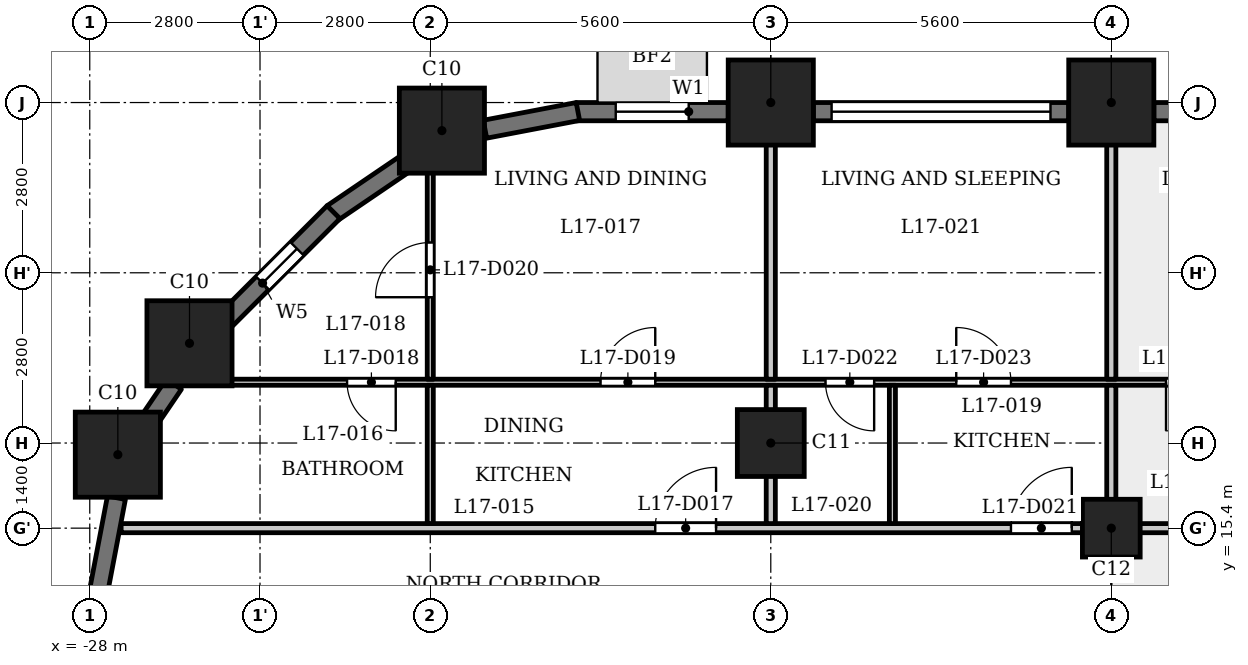
"""IFC4 building model, lengths in metres.
Left out: names, types, materials, properties, quantities, classifications, styles, units other than length and angle.
Written with IfcOpenShell. Run it as: python <this file> out.ifc"""

import sys

from ifc_helpers import new_model, si_unit, direction, frame, frame_2d, origin, origin_2d, place, context, subcontext, project, spatial, rectangle, extrude, element, fill, save


model = new_model("IFC4")
c1 = context("Model", 3, precision=1e-05, world=origin(), true_north=direction((0.0, 1.0)))
c2 = subcontext(c1, "Body", "Model", "MODEL_VIEW")
j1 = project(units=[si_unit("LENGTHUNIT", "METRE"), si_unit("PLANEANGLEUNIT", "RADIAN")], contexts=[c1])
p1 = place(None, origin())
s1 = spatial("IfcSite", under=j1, at=p1, CompositionType="ELEMENT")
p2 = place(p1, origin())
s2 = spatial("IfcBuilding", under=s1, at=p2, CompositionType="ELEMENT")
p3 = place(p2, frame((0.0, 0.0, 69.0)))
s3 = spatial("IfcBuildingStorey", under=s2, at=p3, CompositionType="ELEMENT", Elevation=69.0)
for number, where, z_axis, x_axis in (
    (1, (-11.2, 22.4, 0.0), (0.0, 0.0, 1.0), (1.0, 0.0, 0.0)),
    (2, (-16.8, 22.4, 0.0), (0.0, 0.0, 1.0), (1.0, 0.0, 0.0)),
    (3, (-22.209, 21.938, 0.0), (0.0, 0.0, 1.0), (1.0, 0.0, 0.0)),
    (4, (-26.36, 18.44, 0.0), (0.0, 0.0, 1.0), (1.0, 0.0, 0.0)),
    (5, (-27.538, 16.609, 0.0), (0.0, 0.0, 1.0), (1.0, 0.0, 0.0)),
):
    element("IfcColumn", number, at=place(p3, frame(where, z_axis=z_axis, x_axis=x_axis)), inside=s3, PredefinedType="COLUMN", context=c2, shape_type="SweptSolid", body=[
        extrude(rectangle(XDim=1.4, YDim=1.4, at=origin_2d()), origin(), (0.0, 0.0, 1.0), 3.5),
    ])
p4 = place(p3, frame((-16.8, 16.8, 0.0), z_axis=(0.0, 0.0, 1.0), x_axis=(1.0, 0.0, 0.0)))
e6 = element("IfcColumn", 6, at=p4, inside=s3, PredefinedType="COLUMN", context=c2, shape_type="SweptSolid", body=[
    extrude(rectangle(XDim=1.1, YDim=1.1, at=origin_2d()), origin(), (0.0, 0.0, 1.0), 3.5),
])
p5 = place(p3, frame((-11.2, 15.4, 0.0), z_axis=(0.0, 0.0, 1.0), x_axis=(1.0, 0.0, 0.0)))
e7 = element("IfcColumn", 7, at=p5, inside=s3, PredefinedType="COLUMN", context=c2, shape_type="SweptSolid", body=[
    extrude(rectangle(XDim=0.95, YDim=0.95, at=origin_2d()), origin(), (0.0, 0.0, 1.0), 3.5),
])
p6 = place(p3, frame((-6.3, 22.25, 0.0), z_axis=(0.0, 0.0, 1.0), x_axis=(-1.0, 0.0, 0.0)))
e8 = element("IfcWall", 8, at=p6, inside=s3, PredefinedType="SOLIDWALL", context=c2, shape_type="SweptSolid", body=[
    extrude(rectangle(XDim=4.2, YDim=0.3, at=frame_2d((2.1, 0.0))), origin(), (0.0, 0.0, 1.0), 2.3),
])
p7 = place(p6, frame((0.3, 0.0, 1.2)))
e9 = element("IfcOpeningElement", 9, at=p7, cuts=e8, PredefinedType="OPENING", context=c2, shape_type="SweptSolid", body=[
    extrude(rectangle(XDim=3.6, YDim=0.95, at=frame_2d((1.8, 0.475))), frame((0.0, 0.16, 0.0), z_axis=(0.0, -1.0, 0.0), x_axis=(1.0, 0.0, 0.0)), (0.0, 0.0, 1.0), 0.32),
])
p8 = place(p3, frame((-11.9, 22.25, 0.0), z_axis=(0.0, 0.0, 1.0), x_axis=(-1.0, 0.0, 0.0)))
e10 = element("IfcWall", 10, at=p8, inside=s3, PredefinedType="SOLIDWALL", context=c2, shape_type="SweptSolid", body=[
    extrude(rectangle(XDim=4.2, YDim=0.3, at=frame_2d((2.1, 0.0))), origin(), (0.0, 0.0, 1.0), 2.3),
])
p9 = place(p8, frame((0.3, 0.0, 1.2)))
e11 = element("IfcOpeningElement", 11, at=p9, cuts=e10, PredefinedType="OPENING", context=c2, shape_type="SweptSolid", body=[
    extrude(rectangle(XDim=3.6, YDim=0.95, at=frame_2d((1.8, 0.475))), frame((0.0, 0.16, 0.0), z_axis=(0.0, -1.0, 0.0), x_axis=(1.0, 0.0, 0.0)), (0.0, 0.0, 1.0), 0.32),
])
p10 = place(p3, frame((-17.5, 22.25, 0.0), z_axis=(0.0, 0.0, 1.0), x_axis=(-1.0, 0.0, 0.0)))
e12 = element("IfcWall", 12, at=p10, inside=s3, PredefinedType="SOLIDWALL", context=c2, shape_type="SweptSolid", body=[
    extrude(rectangle(XDim=2.5, YDim=0.3, at=frame_2d((1.25, 0.0))), origin(), (0.0, 0.0, 1.0), 2.3),
])
p11 = place(p10, frame((0.65, 0.0, 0.6)))
e13 = element("IfcOpeningElement", 13, at=p11, cuts=e12, PredefinedType="OPENING", context=c2, shape_type="SweptSolid", body=[
    extrude(rectangle(XDim=1.2, YDim=1.55, at=frame_2d((0.6, 0.775))), frame((0.0, 0.16, 0.0), z_axis=(0.0, -1.0, 0.0), x_axis=(1.0, 0.0, 0.0)), (0.0, 0.0, 1.0), 0.32),
])
p12 = place(p3, frame((-19.972, 22.253, 0.0), z_axis=(0.0, 0.0, 1.0), x_axis=(-0.982297345734, -0.187328386968, 0.0)))
e14 = element("IfcWall", 14, at=p12, inside=s3, PredefinedType="SOLIDWALL", context=c2, shape_type="SweptSolid", body=[
    extrude(rectangle(XDim=1.556, YDim=0.3, at=frame_2d((0.778, 0.0))), origin(), (0.0, 0.0, 1.0), 2.3),
])
p13 = place(p3, frame((-22.726, 21.454, 0.0), z_axis=(0.0, 0.0, 1.0), x_axis=(-0.827019875346, -0.562172683241, 0.0)))
e15 = element("IfcWall", 15, at=p13, inside=s3, PredefinedType="SOLIDWALL", context=c2, shape_type="SweptSolid", body=[
    extrude(rectangle(XDim=1.556, YDim=0.3, at=frame_2d((0.778, 0.0))), origin(), (0.0, 0.0, 1.0), 2.3),
])
p14 = place(p3, frame((-23.991, 20.597, 0.0), z_axis=(0.0, 0.0, 1.0), x_axis=(-0.707106781187, -0.707106781187, 0.0)))
e16 = element("IfcWall", 16, at=p14, inside=s3, PredefinedType="SOLIDWALL", context=c2, shape_type="SweptSolid", body=[
    extrude(rectangle(XDim=2.5, YDim=0.3, at=frame_2d((1.25, 0.0))), origin(), (0.0, 0.0, 1.0), 2.3),
])
p15 = place(p14, frame((0.85, 0.0, 0.6)))
e17 = element("IfcOpeningElement", 17, at=p15, cuts=e16, PredefinedType="OPENING", context=c2, shape_type="SweptSolid", body=[
    extrude(rectangle(XDim=0.8, YDim=1.55, at=frame_2d((0.4, 0.775))), frame((0.0, 0.16, 0.0), z_axis=(0.0, -1.0, 0.0), x_axis=(1.0, 0.0, 0.0)), (0.0, 0.0, 1.0), 0.32),
])
p16 = place(p3, frame((-26.617, 17.769, 0.0), z_axis=(0.0, 0.0, 1.0), x_axis=(-0.562000651531, -0.827136788977, 0.0)))
e18 = element("IfcWall", 18, at=p16, inside=s3, PredefinedType="SOLIDWALL", context=c2, shape_type="SweptSolid", body=[
    extrude(rectangle(XDim=0.777, YDim=0.3, at=frame_2d((0.389, 0.0))), origin(), (0.0, 0.0, 1.0), 3.15),
])
p17 = place(p3, frame((-27.561, 15.9, 0.0), z_axis=(0.0, 0.0, 1.0), x_axis=(-0.187328386968, -0.982297345734, 0.0)))
e19 = element("IfcWall", 19, at=p17, inside=s3, PredefinedType="SOLIDWALL", context=c2, shape_type="SweptSolid", body=[
    extrude(rectangle(XDim=1.556, YDim=0.3, at=frame_2d((0.778, 0.0))), origin(), (0.0, 0.0, 1.0), 2.3),
])
p18 = place(p3, frame((-27.484, 15.4, 0.0), z_axis=(0.0, 0.0, 1.0), x_axis=(1.0, 0.0, 0.0)))
e20 = element("IfcWall", 20, at=p18, inside=s3, PredefinedType="PARTITIONING", context=c2, shape_type="SweptSolid", body=[
    extrude(rectangle(XDim=54.968, YDim=0.15, at=frame_2d((27.484, 0.0))), origin(), (0.0, 0.0, 1.0), 3.15),
])
p19 = place(p18, frame((8.784, 0.0, 0.0)))
e21 = element("IfcOpeningElement", 21, at=p19, cuts=e20, PredefinedType="OPENING", context=c2, shape_type="SweptSolid", body=[
    extrude(rectangle(XDim=1.0, YDim=2.1, at=frame_2d((0.5, 1.05))), frame((0.0, 0.085, 0.0), z_axis=(0.0, -1.0, 0.0), x_axis=(1.0, 0.0, 0.0)), (0.0, 0.0, 1.0), 0.17),
])
p20 = place(p18, frame((14.634, 0.0, 0.0)))
e22 = element("IfcOpeningElement", 22, at=p20, cuts=e20, PredefinedType="OPENING", context=c2, shape_type="SweptSolid", body=[
    extrude(rectangle(XDim=1.0, YDim=2.1, at=frame_2d((0.5, 1.05))), frame((0.0, 0.085, 0.0), z_axis=(0.0, -1.0, 0.0), x_axis=(1.0, 0.0, 0.0)), (0.0, 0.0, 1.0), 0.17),
])
p21 = place(p18, frame((19.484, 0.0, 0.0)))
e23 = element("IfcOpeningElement", 23, at=p21, cuts=e20, PredefinedType="OPENING", context=c2, shape_type="SweptSolid", body=[
    extrude(rectangle(XDim=1.0, YDim=2.1, at=frame_2d((0.5, 1.05))), frame((0.0, 0.085, 0.0), z_axis=(0.0, -1.0, 0.0), x_axis=(1.0, 0.0, 0.0)), (0.0, 0.0, 1.0), 0.17),
])
p22 = place(p18, frame((23.634, 0.0, 0.0)))
e24 = element("IfcOpeningElement", 24, at=p22, cuts=e20, PredefinedType="OPENING", context=c2, shape_type="SweptSolid", body=[
    extrude(rectangle(XDim=1.0, YDim=2.1, at=frame_2d((0.5, 1.05))), frame((0.0, 0.085, 0.0), z_axis=(0.0, -1.0, 0.0), x_axis=(1.0, 0.0, 0.0)), (0.0, 0.0, 1.0), 0.17),
])
p23 = place(p18, frame((28.234, 0.0, 0.0)))
e25 = element("IfcOpeningElement", 25, at=p23, cuts=e20, PredefinedType="OPENING", context=c2, shape_type="SweptSolid", body=[
    extrude(rectangle(XDim=1.0, YDim=2.1, at=frame_2d((0.5, 1.05))), frame((0.0, 0.085, 0.0), z_axis=(0.0, -1.0, 0.0), x_axis=(1.0, 0.0, 0.0)), (0.0, 0.0, 1.0), 0.17),
])
p24 = place(p18, frame((33.784, 0.0, 0.0)))
e26 = element("IfcOpeningElement", 26, at=p24, cuts=e20, PredefinedType="OPENING", context=c2, shape_type="SweptSolid", body=[
    extrude(rectangle(XDim=1.0, YDim=2.1, at=frame_2d((0.5, 1.05))), frame((0.0, 0.085, 0.0), z_axis=(0.0, -1.0, 0.0), x_axis=(1.0, 0.0, 0.0)), (0.0, 0.0, 1.0), 0.17),
])
p25 = place(p18, frame((39.534, 0.0, 0.0)))
e27 = element("IfcOpeningElement", 27, at=p25, cuts=e20, PredefinedType="OPENING", context=c2, shape_type="SweptSolid", body=[
    extrude(rectangle(XDim=1.0, YDim=2.1, at=frame_2d((0.5, 1.05))), frame((0.0, 0.085, 0.0), z_axis=(0.0, -1.0, 0.0), x_axis=(1.0, 0.0, 0.0)), (0.0, 0.0, 1.0), 0.17),
])
p26 = place(p18, frame((48.234, 0.0, 0.0)))
e28 = element("IfcOpeningElement", 28, at=p26, cuts=e20, PredefinedType="OPENING", context=c2, shape_type="SweptSolid", body=[
    extrude(rectangle(XDim=1.0, YDim=2.1, at=frame_2d((0.5, 1.05))), frame((0.0, 0.085, 0.0), z_axis=(0.0, -1.0, 0.0), x_axis=(1.0, 0.0, 0.0)), (0.0, 0.0, 1.0), 0.17),
])
p27 = place(p3, frame((-26.64, 17.8, 0.0), z_axis=(0.0, 0.0, 1.0), x_axis=(1.0, 0.0, 0.0)))
e29 = element("IfcWall", 29, at=p27, inside=s3, PredefinedType="PARTITIONING", context=c2, shape_type="SweptSolid", body=[
    extrude(rectangle(XDim=53.034, YDim=0.1, at=frame_2d((26.517, 0.0))), origin(), (0.0, 0.0, 1.0), 3.15),
])
p28 = place(p27, frame((2.872, 0.0, 0.0)))
e30 = element("IfcOpeningElement", 30, at=p28, cuts=e29, PredefinedType="OPENING", context=c2, shape_type="SweptSolid", body=[
    extrude(rectangle(XDim=0.8, YDim=2.1, at=frame_2d((0.4, 1.05))), frame((0.0, 0.06, 0.0), z_axis=(0.0, -1.0, 0.0), x_axis=(1.0, 0.0, 0.0)), (0.0, 0.0, 1.0), 0.12),
])
p29 = place(p27, frame((7.04, 0.0, 0.0)))
e31 = element("IfcOpeningElement", 31, at=p29, cuts=e29, PredefinedType="OPENING", context=c2, shape_type="SweptSolid", body=[
    extrude(rectangle(XDim=0.9, YDim=2.1, at=frame_2d((0.45, 1.05))), frame((0.0, 0.06, 0.0), z_axis=(0.0, -1.0, 0.0), x_axis=(1.0, 0.0, 0.0)), (0.0, 0.0, 1.0), 0.12),
])
p30 = place(p27, frame((10.74, 0.0, 0.0)))
e32 = element("IfcOpeningElement", 32, at=p30, cuts=e29, PredefinedType="OPENING", context=c2, shape_type="SweptSolid", body=[
    extrude(rectangle(XDim=0.8, YDim=2.1, at=frame_2d((0.4, 1.05))), frame((0.0, 0.06, 0.0), z_axis=(0.0, -1.0, 0.0), x_axis=(1.0, 0.0, 0.0)), (0.0, 0.0, 1.0), 0.12),
])
p31 = place(p27, frame((12.89, 0.0, 0.0)))
e33 = element("IfcOpeningElement", 33, at=p31, cuts=e29, PredefinedType="OPENING", context=c2, shape_type="SweptSolid", body=[
    extrude(rectangle(XDim=0.9, YDim=2.1, at=frame_2d((0.45, 1.05))), frame((0.0, 0.06, 0.0), z_axis=(0.0, -1.0, 0.0), x_axis=(1.0, 0.0, 0.0)), (0.0, 0.0, 1.0), 0.12),
])
p32 = place(p27, frame((16.34, 0.0, 0.0)))
e34 = element("IfcOpeningElement", 34, at=p32, cuts=e29, PredefinedType="OPENING", context=c2, shape_type="SweptSolid", body=[
    extrude(rectangle(XDim=0.8, YDim=2.1, at=frame_2d((0.4, 1.05))), frame((0.0, 0.06, 0.0), z_axis=(0.0, -1.0, 0.0), x_axis=(1.0, 0.0, 0.0)), (0.0, 0.0, 1.0), 0.12),
])
p33 = place(p27, frame((19.74, 0.0, 0.0)))
e35 = element("IfcOpeningElement", 35, at=p33, cuts=e29, PredefinedType="OPENING", context=c2, shape_type="SweptSolid", body=[
    extrude(rectangle(XDim=0.9, YDim=2.1, at=frame_2d((0.45, 1.05))), frame((0.0, 0.06, 0.0), z_axis=(0.0, -1.0, 0.0), x_axis=(1.0, 0.0, 0.0)), (0.0, 0.0, 1.0), 0.12),
])
p34 = place(p27, frame((25.09, 0.0, 0.0)))
e36 = element("IfcOpeningElement", 36, at=p34, cuts=e29, PredefinedType="OPENING", context=c2, shape_type="SweptSolid", body=[
    extrude(rectangle(XDim=0.8, YDim=2.1, at=frame_2d((0.4, 1.05))), frame((0.0, 0.06, 0.0), z_axis=(0.0, -1.0, 0.0), x_axis=(1.0, 0.0, 0.0)), (0.0, 0.0, 1.0), 0.12),
])
p35 = place(p27, frame((21.89, 0.0, 0.0)))
e37 = element("IfcOpeningElement", 37, at=p35, cuts=e29, PredefinedType="OPENING", context=c2, shape_type="SweptSolid", body=[
    extrude(rectangle(XDim=0.9, YDim=2.1, at=frame_2d((0.45, 1.05))), frame((0.0, 0.06, 0.0), z_axis=(0.0, -1.0, 0.0), x_axis=(1.0, 0.0, 0.0)), (0.0, 0.0, 1.0), 0.12),
])
p36 = place(p27, frame((30.69, 0.0, 0.0)))
e38 = element("IfcOpeningElement", 38, at=p36, cuts=e29, PredefinedType="OPENING", context=c2, shape_type="SweptSolid", body=[
    extrude(rectangle(XDim=0.8, YDim=2.1, at=frame_2d((0.4, 1.05))), frame((0.0, 0.06, 0.0), z_axis=(0.0, -1.0, 0.0), x_axis=(1.0, 0.0, 0.0)), (0.0, 0.0, 1.0), 0.12),
])
p37 = place(p27, frame((28.49, 0.0, 0.0)))
e39 = element("IfcOpeningElement", 39, at=p37, cuts=e29, PredefinedType="OPENING", context=c2, shape_type="SweptSolid", body=[
    extrude(rectangle(XDim=0.9, YDim=2.1, at=frame_2d((0.45, 1.05))), frame((0.0, 0.06, 0.0), z_axis=(0.0, -1.0, 0.0), x_axis=(1.0, 0.0, 0.0)), (0.0, 0.0, 1.0), 0.12),
])
p38 = place(p27, frame((36.49, 0.0, 0.0)))
e40 = element("IfcOpeningElement", 40, at=p38, cuts=e29, PredefinedType="OPENING", context=c2, shape_type="SweptSolid", body=[
    extrude(rectangle(XDim=0.8, YDim=2.1, at=frame_2d((0.4, 1.05))), frame((0.0, 0.06, 0.0), z_axis=(0.0, -1.0, 0.0), x_axis=(1.0, 0.0, 0.0)), (0.0, 0.0, 1.0), 0.12),
])
p39 = place(p27, frame((33.04, 0.0, 0.0)))
e41 = element("IfcOpeningElement", 41, at=p39, cuts=e29, PredefinedType="OPENING", context=c2, shape_type="SweptSolid", body=[
    extrude(rectangle(XDim=0.9, YDim=2.1, at=frame_2d((0.45, 1.05))), frame((0.0, 0.06, 0.0), z_axis=(0.0, -1.0, 0.0), x_axis=(1.0, 0.0, 0.0)), (0.0, 0.0, 1.0), 0.12),
])
p40 = place(p27, frame((41.49, 0.0, 0.0)))
e42 = element("IfcOpeningElement", 42, at=p40, cuts=e29, PredefinedType="OPENING", context=c2, shape_type="SweptSolid", body=[
    extrude(rectangle(XDim=0.8, YDim=2.1, at=frame_2d((0.4, 1.05))), frame((0.0, 0.06, 0.0), z_axis=(0.0, -1.0, 0.0), x_axis=(1.0, 0.0, 0.0)), (0.0, 0.0, 1.0), 0.12),
])
p41 = place(p27, frame((39.79, 0.0, 0.0)))
e43 = element("IfcOpeningElement", 43, at=p41, cuts=e29, PredefinedType="OPENING", context=c2, shape_type="SweptSolid", body=[
    extrude(rectangle(XDim=0.9, YDim=2.1, at=frame_2d((0.45, 1.05))), frame((0.0, 0.06, 0.0), z_axis=(0.0, -1.0, 0.0), x_axis=(1.0, 0.0, 0.0)), (0.0, 0.0, 1.0), 0.12),
])
p42 = place(p27, frame((51.44, 0.0, 0.0)))
e44 = element("IfcOpeningElement", 44, at=p42, cuts=e29, PredefinedType="OPENING", context=c2, shape_type="SweptSolid", body=[
    extrude(rectangle(XDim=0.8, YDim=2.1, at=frame_2d((0.4, 1.05))), frame((0.0, 0.06, 0.0), z_axis=(0.0, -1.0, 0.0), x_axis=(1.0, 0.0, 0.0)), (0.0, 0.0, 1.0), 0.12),
])
p43 = place(p27, frame((46.49, 0.0, 0.0)))
e45 = element("IfcOpeningElement", 45, at=p43, cuts=e29, PredefinedType="OPENING", context=c2, shape_type="SweptSolid", body=[
    extrude(rectangle(XDim=0.9, YDim=2.1, at=frame_2d((0.45, 1.05))), frame((0.0, 0.06, 0.0), z_axis=(0.0, -1.0, 0.0), x_axis=(1.0, 0.0, 0.0)), (0.0, 0.0, 1.0), 0.12),
])
p44 = place(p3, frame((-22.4, 15.475, 0.0), z_axis=(0.0, 0.0, 1.0), x_axis=(0.0, 1.0, 0.0)))
e46 = element("IfcWall", 46, at=p44, inside=s3, PredefinedType="PARTITIONING", context=c2, shape_type="SweptSolid", body=[
    extrude(rectangle(XDim=2.275, YDim=0.1, at=frame_2d((1.137, 0.0))), origin(), (0.0, 0.0, 1.0), 3.15),
])
p45 = place(p3, frame((-22.4, 17.85, 0.0), z_axis=(0.0, 0.0, 1.0), x_axis=(0.0, 1.0, 0.0)))
e47 = element("IfcWall", 47, at=p45, inside=s3, PredefinedType="PARTITIONING", context=c2, shape_type="SweptSolid", body=[
    extrude(rectangle(XDim=3.87, YDim=0.1, at=frame_2d((1.935, 0.0))), origin(), (0.0, 0.0, 1.0), 3.15),
])
p46 = place(p45, frame((1.348, 0.0, 0.0)))
e48 = element("IfcOpeningElement", 48, at=p46, cuts=e47, PredefinedType="OPENING", context=c2, shape_type="SweptSolid", body=[
    extrude(rectangle(XDim=0.9, YDim=2.1, at=frame_2d((0.45, 1.05))), frame((0.0, 0.06, 0.0), z_axis=(0.0, -1.0, 0.0), x_axis=(1.0, 0.0, 0.0)), (0.0, 0.0, 1.0), 0.12),
])
p47 = place(p3, frame((-16.8, 15.475, 0.0), z_axis=(0.0, 0.0, 1.0), x_axis=(0.0, 1.0, 0.0)))
e49 = element("IfcWall", 49, at=p47, inside=s3, PredefinedType="PARTITIONING", context=c2, shape_type="SweptSolid", body=[
    extrude(rectangle(XDim=2.275, YDim=0.15, at=frame_2d((1.137, 0.0))), origin(), (0.0, 0.0, 1.0), 3.15),
])
p48 = place(p3, frame((-16.8, 17.85, 0.0), z_axis=(0.0, 0.0, 1.0), x_axis=(0.0, 1.0, 0.0)))
e50 = element("IfcWall", 50, at=p48, inside=s3, PredefinedType="PARTITIONING", context=c2, shape_type="SweptSolid", body=[
    extrude(rectangle(XDim=5.23, YDim=0.15, at=frame_2d((2.615, 0.0))), origin(), (0.0, 0.0, 1.0), 3.15),
])
p49 = place(p3, frame((-14.8, 15.475, 0.0), z_axis=(0.0, 0.0, 1.0), x_axis=(0.0, 1.0, 0.0)))
e51 = element("IfcWall", 51, at=p49, inside=s3, PredefinedType="PARTITIONING", context=c2, shape_type="SweptSolid", body=[
    extrude(rectangle(XDim=2.275, YDim=0.1, at=frame_2d((1.137, 0.0))), origin(), (0.0, 0.0, 1.0), 3.15),
])
p50 = place(p3, frame((-11.2, 15.475, 0.0), z_axis=(0.0, 0.0, 1.0), x_axis=(0.0, 1.0, 0.0)))
e52 = element("IfcWall", 52, at=p50, inside=s3, PredefinedType="PARTITIONING", context=c2, shape_type="SweptSolid", body=[
    extrude(rectangle(XDim=2.275, YDim=0.15, at=frame_2d((1.137, 0.0))), origin(), (0.0, 0.0, 1.0), 3.15),
])
p51 = place(p3, frame((-11.2, 17.85, 0.0), z_axis=(0.0, 0.0, 1.0), x_axis=(0.0, 1.0, 0.0)))
e53 = element("IfcWall", 53, at=p51, inside=s3, PredefinedType="PARTITIONING", context=c2, shape_type="SweptSolid", body=[
    extrude(rectangle(XDim=5.23, YDim=0.15, at=frame_2d((2.615, 0.0))), origin(), (0.0, 0.0, 1.0), 3.15),
])
p52 = place(p19, origin())
e54 = element("IfcDoor", 54, at=p52, inside=s3, OperationType="SINGLE_SWING_LEFT", PredefinedType="DOOR", context=c2, shape_type="SweptSolid", body=[
    extrude(rectangle(XDim=1.0, YDim=2.1, at=frame_2d((0.5, 1.05))), frame((0.0, 0.025, 0.0), z_axis=(0.0, -1.0, 0.0), x_axis=(1.0, 0.0, 0.0)), (0.0, 0.0, 1.0), 0.05),
])
fill(e21, e54)
p53 = place(p28, origin())
e55 = element("IfcDoor", 55, at=p53, inside=s3, OperationType="SINGLE_SWING_RIGHT", PredefinedType="DOOR", context=c2, shape_type="SweptSolid", body=[
    extrude(rectangle(XDim=0.8, YDim=2.1, at=frame_2d((0.4, 1.05))), frame((0.0, 0.025, 0.0), z_axis=(0.0, -1.0, 0.0), x_axis=(1.0, 0.0, 0.0)), (0.0, 0.0, 1.0), 0.05),
])
fill(e30, e55)
p54 = place(p29, origin())
e56 = element("IfcDoor", 56, at=p54, inside=s3, OperationType="SINGLE_SWING_LEFT", PredefinedType="DOOR", context=c2, shape_type="SweptSolid", body=[
    extrude(rectangle(XDim=0.9, YDim=2.1, at=frame_2d((0.45, 1.05))), frame((0.0, 0.025, 0.0), z_axis=(0.0, -1.0, 0.0), x_axis=(1.0, 0.0, 0.0)), (0.0, 0.0, 1.0), 0.05),
])
fill(e31, e56)
p55 = place(p46, origin())
e57 = element("IfcDoor", 57, at=p55, inside=s3, OperationType="SINGLE_SWING_RIGHT", PredefinedType="DOOR", context=c2, shape_type="SweptSolid", body=[
    extrude(rectangle(XDim=0.9, YDim=2.1, at=frame_2d((0.45, 1.05))), frame((0.0, 0.025, 0.0), z_axis=(0.0, -1.0, 0.0), x_axis=(1.0, 0.0, 0.0)), (0.0, 0.0, 1.0), 0.05),
])
fill(e48, e57)
p56 = place(p20, origin())
e58 = element("IfcDoor", 58, at=p56, inside=s3, OperationType="SINGLE_SWING_LEFT", PredefinedType="DOOR", context=c2, shape_type="SweptSolid", body=[
    extrude(rectangle(XDim=1.0, YDim=2.1, at=frame_2d((0.5, 1.05))), frame((0.0, 0.025, 0.0), z_axis=(0.0, -1.0, 0.0), x_axis=(1.0, 0.0, 0.0)), (0.0, 0.0, 1.0), 0.05),
])
fill(e22, e58)
p57 = place(p30, origin())
e59 = element("IfcDoor", 59, at=p57, inside=s3, OperationType="SINGLE_SWING_RIGHT", PredefinedType="DOOR", context=c2, shape_type="SweptSolid", body=[
    extrude(rectangle(XDim=0.8, YDim=2.1, at=frame_2d((0.4, 1.05))), frame((0.0, 0.025, 0.0), z_axis=(0.0, -1.0, 0.0), x_axis=(1.0, 0.0, 0.0)), (0.0, 0.0, 1.0), 0.05),
])
fill(e32, e59)
p58 = place(p31, origin())
e60 = element("IfcDoor", 60, at=p58, inside=s3, OperationType="SINGLE_SWING_RIGHT", PredefinedType="DOOR", context=c2, shape_type="SweptSolid", body=[
    extrude(rectangle(XDim=0.9, YDim=2.1, at=frame_2d((0.45, 1.05))), frame((0.0, 0.025, 0.0), z_axis=(0.0, -1.0, 0.0), x_axis=(1.0, 0.0, 0.0)), (0.0, 0.0, 1.0), 0.05),
])
fill(e33, e60)
p59 = place(p32, origin())
e61 = element("IfcDoor", 61, at=p59, inside=s3, OperationType="SINGLE_SWING_LEFT", PredefinedType="DOOR", context=c2, shape_type="SweptSolid", body=[
    extrude(rectangle(XDim=0.8, YDim=2.1, at=frame_2d((0.4, 1.05))), frame((0.0, 0.025, 0.0), z_axis=(0.0, -1.0, 0.0), x_axis=(1.0, 0.0, 0.0)), (0.0, 0.0, 1.0), 0.05),
])
fill(e34, e61)
p60 = place(p9, origin())
e62 = element("IfcWindow", 62, at=p60, inside=s3, PartitioningType="SINGLE_PANEL", PredefinedType="WINDOW", context=c2, shape_type="SweptSolid", body=[
    extrude(rectangle(XDim=3.6, YDim=0.95, at=frame_2d((1.8, 0.475))), frame((0.0, 0.03, 0.0), z_axis=(0.0, -1.0, 0.0), x_axis=(1.0, 0.0, 0.0)), (0.0, 0.0, 1.0), 0.06),
])
fill(e11, e62)
p61 = place(p11, origin())
e63 = element("IfcWindow", 63, at=p61, inside=s3, PartitioningType="SINGLE_PANEL", PredefinedType="WINDOW", context=c2, shape_type="SweptSolid", body=[
    extrude(rectangle(XDim=1.2, YDim=1.55, at=frame_2d((0.6, 0.775))), frame((0.0, 0.03, 0.0), z_axis=(0.0, -1.0, 0.0), x_axis=(1.0, 0.0, 0.0)), (0.0, 0.0, 1.0), 0.06),
])
fill(e13, e63)
p62 = place(p15, origin())
e64 = element("IfcWindow", 64, at=p62, inside=s3, PartitioningType="SINGLE_PANEL", PredefinedType="WINDOW", context=c2, shape_type="SweptSolid", body=[
    extrude(rectangle(XDim=0.8, YDim=1.55, at=frame_2d((0.4, 0.775))), frame((0.0, 0.03, 0.0), z_axis=(0.0, -1.0, 0.0), x_axis=(1.0, 0.0, 0.0)), (0.0, 0.0, 1.0), 0.06),
])
fill(e17, e64)
save(model, sys.argv[1])
